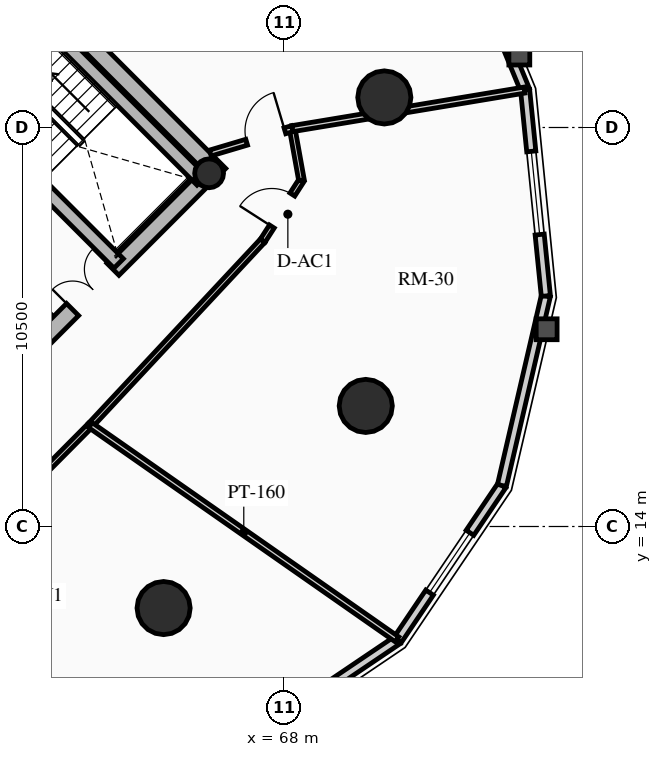
"""IFC4 building model, lengths in metres.
Left out: names, types, materials, properties, quantities, classifications, styles, units other than length and angle.
Written with IfcOpenShell. Run it as: python <this file> out.ifc"""

import sys

from ifc_helpers import new_model, si_unit, direction, frame, frame_2d, origin, origin_2d, place, context, subcontext, project, spatial, rectangle, circle, hollow_circle, extrude, source, transform, mapped, element, fill, save


model = new_model("IFC4")
c1 = context("Model", 3, precision=1e-05, world=origin(), true_north=direction((0.0, 1.0)))
c2 = subcontext(c1, "Body", "Model", "MODEL_VIEW")
j1 = project(units=[si_unit("LENGTHUNIT", "METRE"), si_unit("PLANEANGLEUNIT", "RADIAN")], contexts=[c1])
p1 = place(None, origin())
s1 = spatial("IfcSite", under=j1, at=p1, CompositionType="ELEMENT")
p2 = place(p1, origin())
s2 = spatial("IfcBuilding", under=s1, at=p2, CompositionType="ELEMENT")
p3 = place(p2, frame((0.0, 0.0, 116.71)))
s3 = spatial("IfcBuildingStorey", under=s2, at=p3, CompositionType="ELEMENT", Elevation=116.71)
p4 = place(p3, frame((66.303, 23.263, 0.0), z_axis=(0.0, 0.0, 1.0), x_axis=(-0.707106781187, 0.707106781187, 0.0)))
e1 = element("IfcWall", 1, at=p4, inside=s3, PredefinedType="SHEAR", context=c2, shape_type="SweptSolid", body=[
    extrude(rectangle(XDim=14.2, YDim=0.45, at=frame_2d((7.1, 0.0))), origin(), (0.0, 0.0, 1.0), 2.91),
])
p5 = place(p3, frame((58.578, 15.856, 0.0), z_axis=(0.0, 0.0, 1.0), x_axis=(0.707106781187, 0.707106781187, 0.0)))
e2 = element("IfcWall", 2, at=p5, inside=s3, PredefinedType="SHEAR", context=c2, shape_type="SweptSolid", body=[
    extrude(rectangle(XDim=10.7, YDim=0.45, at=frame_2d((5.35, 0.0))), origin(), (0.0, 0.0, 1.0), 2.91),
])
m1 = source(origin(), c2, "Body", "SweptSolid", [
    extrude(rectangle(XDim=1.5, YDim=2.02, at=frame_2d((0.75, 1.01))), frame((0.0, 0.235, 0.0), z_axis=(0.0, -1.0, 0.0), x_axis=(1.0, 0.0, 0.0)), (0.0, 0.0, 1.0), 0.47),
])
p6 = place(p5, frame((5.45, 0.0, 0.0)))
e3 = element("IfcOpeningElement", 3, at=p6, cuts=e2, PredefinedType="OPENING", context=c2, shape_type="MappedRepresentation", body=[
    mapped(m1, transform((0.0, 0.0, 0.0), x_axis=(1.0, 0.0, 0.0), y_axis=(0.0, 1.0, 0.0), z_axis=(0.0, 0.0, 1.0), scale=1.0)),
])
p7 = place(p3, frame((63.645, 20.922, 0.0), z_axis=(0.0, 0.0, 1.0), x_axis=(-0.707106781187, 0.707106781187, 0.0)))
e4 = element("IfcWall", 4, at=p7, inside=s3, PredefinedType="SHEAR", context=c2, shape_type="SweptSolid", body=[
    extrude(rectangle(XDim=13.75, YDim=0.35, at=frame_2d((6.875, 0.0))), origin(), (0.0, 0.0, 1.0), 2.91),
])
m2 = source(origin(), c2, "Body", "SweptSolid", [
    extrude(rectangle(XDim=1.1, YDim=2.015, at=frame_2d((0.55, 1.007))), frame((0.0, 0.185, 0.0), z_axis=(0.0, -1.0, 0.0), x_axis=(1.0, 0.0, 0.0)), (0.0, 0.0, 1.0), 0.37),
])
p8 = place(p7, frame((10.0, 0.0, 0.0)))
e5 = element("IfcOpeningElement", 5, at=p8, cuts=e4, PredefinedType="OPENING", context=c2, shape_type="MappedRepresentation", body=[
    mapped(m2, transform((0.0, 0.0, 0.0), x_axis=(1.0, 0.0, 0.0), y_axis=(0.0, 1.0, 0.0), z_axis=(0.0, 0.0, 1.0), scale=1.0)),
])
p9 = place(p7, frame((12.0, 0.0, 0.0)))
e6 = element("IfcOpeningElement", 6, at=p9, cuts=e4, PredefinedType="OPENING", context=c2, shape_type="MappedRepresentation", body=[
    mapped(m2, transform((0.0, 0.0, 0.0), x_axis=(1.0, 0.0, 0.0), y_axis=(0.0, 1.0, 0.0), z_axis=(0.0, 0.0, 1.0), scale=1.0)),
])
m3 = source(origin(), c2, "Body", "SweptSolid", [
    extrude(rectangle(XDim=1.15, YDim=2.02, at=frame_2d((0.575, 1.01))), frame((0.0, 0.185, 0.0), z_axis=(0.0, -1.0, 0.0), x_axis=(1.0, 0.0, 0.0)), (0.0, 0.0, 1.0), 0.37),
])
p10 = place(p7, frame((5.305, 0.0, 0.0)))
e7 = element("IfcOpeningElement", 7, at=p10, cuts=e4, PredefinedType="OPENING", context=c2, shape_type="MappedRepresentation", body=[
    mapped(m3, transform((0.0, 0.0, 0.0), x_axis=(1.0, 0.0, 0.0), y_axis=(0.0, 1.0, 0.0), z_axis=(0.0, 0.0, 1.0), scale=1.0)),
])
p11 = place(p3, frame((65.83, 23.107, 0.0), z_axis=(0.0, 0.0, 1.0), x_axis=(-0.707088616009, 0.707124945897, 0.0)))
e8 = element("IfcWall", 8, at=p11, inside=s3, PredefinedType="SHEAR", context=c2, shape_type="SweptSolid", body=[
    extrude(rectangle(XDim=6.72, YDim=0.35, at=frame_2d((3.36, 0.0))), origin(), (0.0, 0.0, 1.0), 2.91),
])
p12 = place(p3, frame((66.024, 23.294, 0.0), z_axis=(0.0, 0.0, 1.0), x_axis=(0.707106781187, 0.707106781187, 0.0)))
e9 = element("IfcColumn", 9, at=p12, inside=s3, PredefinedType="COLUMN", context=c2, shape_type="SweptSolid", body=[
    extrude(hollow_circle(Radius=0.38, WallThickness=0.032, at=origin_2d()), origin(), (0.0, 0.0, 1.0), 2.91),
])
for number, where, z_axis, x_axis in (
    (10, (64.827, 11.854, 0.0), (0.0, 0.0, 1.0), (1.0, 0.0, 0.0)),
    (11, (70.146, 17.173, 0.0), (0.0, 0.0, 1.0), (1.0, 0.0, 0.0)),
    (12, (70.635, 25.291, 0.0), (0.0, 0.0, 1.0), (1.0, 0.0, 0.0)),
):
    element("IfcColumn", number, at=place(p3, frame(where, z_axis=z_axis, x_axis=x_axis)), inside=s3, PredefinedType="USERDEFINED", context=c2, shape_type="SweptSolid", body=[
        extrude(circle(Radius=0.7, at=origin_2d()), origin(), (0.0, 0.0, 1.0), 2.91),
    ])
p13 = place(p3, frame((70.985, 11.015, 0.0), z_axis=(0.0, 0.0, 1.0), x_axis=(-0.828781148131, -0.559572880421, 0.0)))
e13 = element("IfcWall", 13, at=p13, inside=s3, PredefinedType="SOLIDWALL", context=c2, shape_type="SweptSolid", body=[
    extrude(rectangle(XDim=4.905, YDim=0.24, at=frame_2d((2.452, 0.0))), origin(), (0.0, 0.0, 1.0), 2.179),
])
p14 = place(p3, frame((73.729, 15.08, 0.0), z_axis=(0.0, 0.0, 1.0), x_axis=(-0.559572880421, -0.828781148131, 0.0)))
e14 = element("IfcWall", 14, at=p14, inside=s3, PredefinedType="SOLIDWALL", context=c2, shape_type="SweptSolid", body=[
    extrude(rectangle(XDim=4.905, YDim=0.24, at=frame_2d((2.452, 0.0))), origin(), (0.0, 0.0, 1.0), 2.179),
])
m4 = source(origin(), c2, "Body", "SweptSolid", [
    extrude(rectangle(XDim=1.9, YDim=1.35, at=frame_2d((0.95, 0.675))), frame((0.0, 0.13, 0.0), z_axis=(0.0, -1.0, 0.0), x_axis=(1.0, 0.0, 0.0)), (0.0, 0.0, 1.0), 0.26),
])
p15 = place(p14, frame((1.502, 0.0, 0.65)))
e15 = element("IfcOpeningElement", 15, at=p15, cuts=e14, PredefinedType="OPENING", context=c2, shape_type="MappedRepresentation", body=[
    mapped(m4, transform((0.0, 0.0, 0.0), x_axis=(1.0, 0.0, 0.0), y_axis=(0.0, 1.0, 0.0), z_axis=(0.0, 0.0, 1.0), scale=1.0)),
])
p16 = place(p3, frame((74.885, 20.067, 0.0), z_axis=(0.0, 0.0, 1.0), x_axis=(-0.225834725257, -0.974165631126, 0.0)))
e16 = element("IfcWall", 16, at=p16, inside=s3, PredefinedType="SOLIDWALL", context=c2, shape_type="SweptSolid", body=[
    extrude(rectangle(XDim=5.119, YDim=0.24, at=frame_2d((2.56, 0.0))), origin(), (0.0, 0.0, 1.0), 2.179),
])
p17 = place(p3, frame((74.339, 25.487, 0.0), z_axis=(0.0, 0.0, 1.0), x_axis=(0.10015591906, -0.994971754311, 0.0)))
e17 = element("IfcWall", 17, at=p17, inside=s3, PredefinedType="SOLIDWALL", context=c2, shape_type="SweptSolid", body=[
    extrude(rectangle(XDim=5.448, YDim=0.24, at=frame_2d((2.724, 0.0))), origin(), (0.0, 0.0, 1.0), 2.179),
])
m5 = source(origin(), c2, "Body", "SweptSolid", [
    extrude(rectangle(XDim=2.2, YDim=1.35, at=frame_2d((1.1, 0.675))), frame((0.0, 0.13, 0.0), z_axis=(0.0, -1.0, 0.0), x_axis=(1.0, 0.0, 0.0)), (0.0, 0.0, 1.0), 0.26),
])
p18 = place(p17, frame((1.624, 0.0, 0.65)))
e18 = element("IfcOpeningElement", 18, at=p18, cuts=e17, PredefinedType="OPENING", context=c2, shape_type="MappedRepresentation", body=[
    mapped(m5, transform((0.0, 0.0, 0.0), x_axis=(1.0, 0.0, 0.0), y_axis=(0.0, 1.0, 0.0), z_axis=(0.0, 0.0, 1.0), scale=1.0)),
])
p19 = place(p3, frame((72.145, 30.811, 0.0), z_axis=(0.0, 0.0, 1.0), x_axis=(0.381027003055, -0.924563909604, 0.0)))
e19 = element("IfcWall", 19, at=p19, inside=s3, PredefinedType="SOLIDWALL", context=c2, shape_type="SweptSolid", body=[
    extrude(rectangle(XDim=5.758, YDim=0.24, at=frame_2d((2.879, 0.0))), origin(), (0.0, 0.0, 1.0), 2.179),
])
p20 = place(p3, frame((60.562, 14.31, 0.0), z_axis=(0.0, 0.0, 1.0), x_axis=(0.704566236161, 0.709638230975, 0.0)))
e20 = element("IfcWall", 20, at=p20, inside=s3, PredefinedType="PARTITIONING", context=c2, shape_type="SweptSolid", body=[
    extrude(rectangle(XDim=3.321, YDim=0.15, at=frame_2d((1.661, 0.0))), origin(), (0.0, 0.0, 1.0), 2.225),
])
p21 = place(p3, frame((62.903, 16.667, 0.0), z_axis=(0.0, 0.0, 1.0), x_axis=(0.682371947497, 0.731005147225, 0.0)))
e21 = element("IfcWall", 21, at=p21, inside=s3, PredefinedType="PARTITIONING", context=c2, shape_type="SweptSolid", body=[
    extrude(rectangle(XDim=6.642, YDim=0.15, at=frame_2d((3.321, 0.0))), origin(), (0.0, 0.0, 1.0), 2.225),
])
p22 = place(p3, frame((67.435, 21.521, 0.0), z_axis=(0.0, 0.0, 1.0), x_axis=(0.540777197838, 0.841165870859, 0.0)))
e22 = element("IfcWall", 22, at=p22, inside=s3, PredefinedType="PARTITIONING", context=c2, shape_type="SweptSolid", body=[
    extrude(rectangle(XDim=1.888, YDim=0.15, at=frame_2d((0.944, 0.0))), origin(), (0.0, 0.0, 1.0), 2.225),
])
m6 = source(origin(), c2, "Body", "SweptSolid", [
    extrude(rectangle(XDim=1.0, YDim=2.015, at=frame_2d((0.5, 1.007))), frame((0.0, 0.085, 0.0), z_axis=(0.0, -1.0, 0.0), x_axis=(1.0, 0.0, 0.0)), (0.0, 0.0, 1.0), 0.17),
])
p23 = place(p22, frame((0.444, 0.0, 0.0)))
e23 = element("IfcOpeningElement", 23, at=p23, cuts=e22, PredefinedType="OPENING", context=c2, shape_type="MappedRepresentation", body=[
    mapped(m6, transform((0.0, 0.0, 0.0), x_axis=(1.0, 0.0, 0.0), y_axis=(0.0, 1.0, 0.0), z_axis=(0.0, 0.0, 1.0), scale=1.0)),
])
p24 = place(p3, frame((68.456, 23.11, 0.0), z_axis=(0.0, 0.0, 1.0), x_axis=(-0.1772522795, 0.984165448191, 0.0)))
e24 = element("IfcWall", 24, at=p24, inside=s3, PredefinedType="PARTITIONING", context=c2, shape_type="SweptSolid", body=[
    extrude(rectangle(XDim=1.382, YDim=0.15, at=frame_2d((0.691, 0.0))), origin(), (0.0, 0.0, 1.0), 2.225),
])
p25 = place(p3, frame((62.903, 16.667, 0.0), z_axis=(0.0, 0.0, 1.0), x_axis=(0.819735047612, -0.572742919395, 0.0)))
e25 = element("IfcWall", 25, at=p25, inside=s3, PredefinedType="PARTITIONING", context=c2, shape_type="SweptSolid", body=[
    extrude(rectangle(XDim=9.842, YDim=0.16, at=frame_2d((4.921, 0.0))), origin(), (0.0, 0.0, 1.0), 2.179),
])
p26 = place(p3, frame((68.211, 24.469, 0.0), z_axis=(0.0, 0.0, 1.0), x_axis=(0.986479033329, 0.163887512651, 0.0)))
e26 = element("IfcWall", 26, at=p26, inside=s3, PredefinedType="PARTITIONING", context=c2, shape_type="SweptSolid", body=[
    extrude(rectangle(XDim=6.193, YDim=0.16, at=frame_2d((3.096, 0.0))), origin(), (0.0, 0.0, 1.0), 2.179),
])
p27 = place(p3, frame((66.056, 23.828, 0.0), z_axis=(0.0, 0.0, 1.0), x_axis=(0.958475403544, 0.285175210708, 0.0)))
e27 = element("IfcWall", 27, at=p27, inside=s3, PredefinedType="PARTITIONING", context=c2, shape_type="SweptSolid", body=[
    extrude(rectangle(XDim=2.248, YDim=0.16, at=frame_2d((1.124, 0.0))), origin(), (0.0, 0.0, 1.0), 2.225),
])
m7 = source(origin(), c2, "Body", "SweptSolid", [
    extrude(rectangle(XDim=1.05, YDim=2.015, at=frame_2d((0.525, 1.007))), frame((0.0, 0.09, 0.0), z_axis=(0.0, -1.0, 0.0), x_axis=(1.0, 0.0, 0.0)), (0.0, 0.0, 1.0), 0.18),
])
p28 = place(p27, frame((0.998, 0.0, 0.0)))
e28 = element("IfcOpeningElement", 28, at=p28, cuts=e27, PredefinedType="OPENING", context=c2, shape_type="MappedRepresentation", body=[
    mapped(m7, transform((0.0, 0.0, 0.0), x_axis=(1.0, 0.0, 0.0), y_axis=(0.0, 1.0, 0.0), z_axis=(0.0, 0.0, 1.0), scale=1.0)),
])
p29 = place(p3, frame((59.008, 13.963, 0.0), z_axis=(0.0, 0.0, 1.0), x_axis=(0.393439207333, -0.919350635032, 0.0)))
e29 = element("IfcWall", 29, at=p29, inside=s3, PredefinedType="PARTITIONING", context=c2, shape_type="SweptSolid", body=[
    extrude(rectangle(XDim=7.427, YDim=0.125, at=frame_2d((3.713, 0.0))), origin(), (0.0, 0.0, 1.0), 2.179),
])
m8 = source(origin(), c2, "Body", "SweptSolid", [
    extrude(rectangle(XDim=0.9, YDim=2.005, at=frame_2d((0.45, 1.002))), frame((0.0, 0.073, 0.0), z_axis=(0.0, -1.0, 0.0), x_axis=(1.0, 0.0, 0.0)), (0.0, 0.0, 1.0), 0.145),
])
p30 = place(p29, frame((1.8, 0.0, 0.0)))
e30 = element("IfcOpeningElement", 30, at=p30, cuts=e29, PredefinedType="OPENING", context=c2, shape_type="MappedRepresentation", body=[
    mapped(m8, transform((0.0, 0.0, 0.0), x_axis=(1.0, 0.0, 0.0), y_axis=(0.0, 1.0, 0.0), z_axis=(0.0, 0.0, 1.0), scale=1.0)),
])
m9 = source(origin(), c2, "Body", "SweptSolid", [
    extrude(rectangle(XDim=1.9, YDim=1.35, at=frame_2d((0.95, 0.675))), frame((0.0, 0.03, 0.0), z_axis=(0.0, -1.0, 0.0), x_axis=(1.0, 0.0, 0.0)), (0.0, 0.0, 1.0), 0.06),
])
p31 = place(p15, origin())
e31 = element("IfcWindow", 31, at=p31, inside=s3, PartitioningType="DOUBLE_PANEL_VERTICAL", PredefinedType="WINDOW", context=c2, shape_type="MappedRepresentation", body=[
    mapped(m9, transform((0.0, 0.0, 0.0), x_axis=(1.0, 0.0, 0.0), y_axis=(0.0, 1.0, 0.0), z_axis=(0.0, 0.0, 1.0), scale=1.0)),
])
fill(e15, e31)
m10 = source(origin(), c2, "Body", "SweptSolid", [
    extrude(rectangle(XDim=2.2, YDim=1.35, at=frame_2d((1.1, 0.675))), frame((0.0, 0.03, 0.0), z_axis=(0.0, -1.0, 0.0), x_axis=(1.0, 0.0, 0.0)), (0.0, 0.0, 1.0), 0.06),
])
p32 = place(p18, origin())
e32 = element("IfcWindow", 32, at=p32, inside=s3, PartitioningType="DOUBLE_PANEL_VERTICAL", PredefinedType="WINDOW", context=c2, shape_type="MappedRepresentation", body=[
    mapped(m10, transform((0.0, 0.0, 0.0), x_axis=(1.0, 0.0, 0.0), y_axis=(0.0, 1.0, 0.0), z_axis=(0.0, 0.0, 1.0), scale=1.0)),
])
fill(e18, e32)
m11 = source(origin(), c2, "Body", "SweptSolid", [
    extrude(rectangle(XDim=1.5, YDim=2.02, at=frame_2d((0.75, 1.01))), frame((0.0, 0.025, 0.0), z_axis=(0.0, -1.0, 0.0), x_axis=(1.0, 0.0, 0.0)), (0.0, 0.0, 1.0), 0.05),
])
p33 = place(p6, origin())
e33 = element("IfcDoor", 33, at=p33, inside=s3, OperationType="DOUBLE_DOOR_SINGLE_SWING", PredefinedType="DOOR", context=c2, shape_type="MappedRepresentation", body=[
    mapped(m11, transform((0.0, 0.0, 0.0), x_axis=(1.0, 0.0, 0.0), y_axis=(0.0, 1.0, 0.0), z_axis=(0.0, 0.0, 1.0), scale=1.0)),
])
fill(e3, e33)
m12 = source(origin(), c2, "Body", "SweptSolid", [
    extrude(rectangle(XDim=1.05, YDim=2.015, at=frame_2d((0.525, 1.007))), frame((0.0, 0.025, 0.0), z_axis=(0.0, -1.0, 0.0), x_axis=(1.0, 0.0, 0.0)), (0.0, 0.0, 1.0), 0.05),
])
p34 = place(p28, origin())
e34 = element("IfcDoor", 34, at=p34, inside=s3, OperationType="SINGLE_SWING_RIGHT", PredefinedType="DOOR", context=c2, shape_type="MappedRepresentation", body=[
    mapped(m12, transform((0.0, 0.0, 0.0), x_axis=(1.0, 0.0, 0.0), y_axis=(0.0, 1.0, 0.0), z_axis=(0.0, 0.0, 1.0), scale=1.0)),
])
fill(e28, e34)
m13 = source(origin(), c2, "Body", "SweptSolid", [
    extrude(rectangle(XDim=1.0, YDim=2.015, at=frame_2d((0.5, 1.007))), frame((0.0, 0.025, 0.0), z_axis=(0.0, -1.0, 0.0), x_axis=(1.0, 0.0, 0.0)), (0.0, 0.0, 1.0), 0.05),
])
p35 = place(p23, origin())
e35 = element("IfcDoor", 35, at=p35, inside=s3, OperationType="SINGLE_SWING_LEFT", PredefinedType="DOOR", context=c2, shape_type="MappedRepresentation", body=[
    mapped(m13, transform((0.0, 0.0, 0.0), x_axis=(1.0, 0.0, 0.0), y_axis=(0.0, 1.0, 0.0), z_axis=(0.0, 0.0, 1.0), scale=1.0)),
])
fill(e23, e35)
save(model, sys.argv[1])
